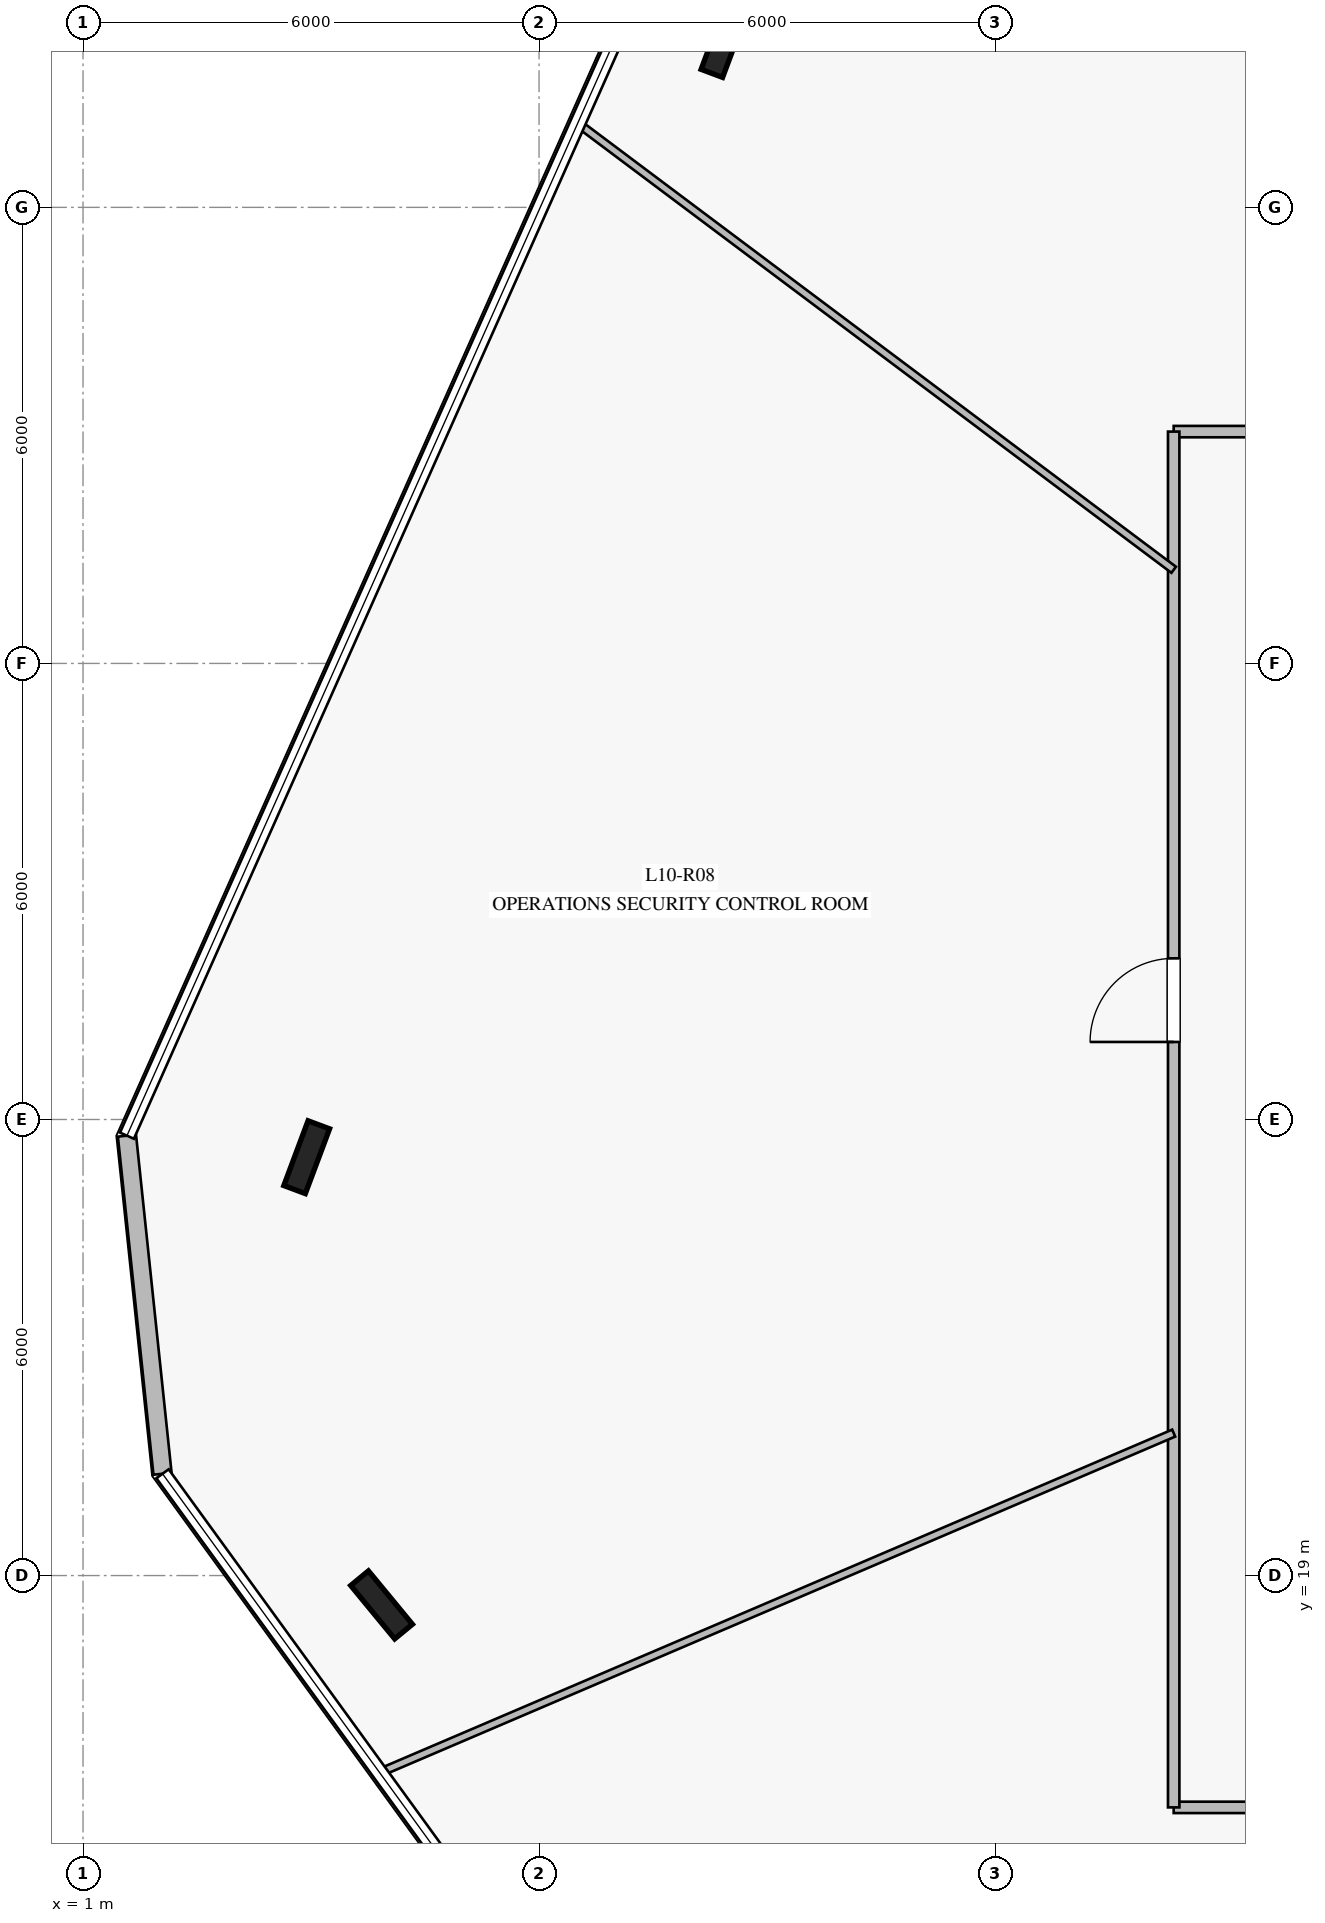
"""IFC4 building model, lengths in metres.
Left out: names, types, materials, properties, quantities, classifications, styles, units other than length and angle.
Written with IfcOpenShell. Run it as: python <this file> out.ifc"""

import sys

from ifc_helpers import new_model, si_unit, direction, frame, frame_2d, origin, origin_2d, place, context, subcontext, project, spatial, rectangle, i_section, extrude, element, fill, save


model = new_model("IFC4")
c1 = context("Model", 3, precision=1e-05, world=origin(), true_north=direction((0.0, 1.0)))
c2 = subcontext(c1, "Body", "Model", "MODEL_VIEW")
j1 = project(units=[si_unit("LENGTHUNIT", "METRE"), si_unit("PLANEANGLEUNIT", "RADIAN")], contexts=[c1])
p1 = place(None, origin())
s1 = spatial("IfcSite", under=j1, at=p1, CompositionType="ELEMENT")
p2 = place(p1, origin())
s2 = spatial("IfcBuilding", under=s1, at=p2, CompositionType="ELEMENT")
p3 = place(p2, frame((0.0, 0.0, 44.0)))
s3 = spatial("IfcBuildingStorey", under=s2, at=p3, CompositionType="ELEMENT", Elevation=44.0)
for number, where, z_axis, x_axis in (
    (1, (9.433, 39.189, 0.0), (0.0, 0.0, 1.0), (0.35, 0.937, 0.0)),
    (2, (3.943, 24.504, 0.0), (0.0, 0.0, 1.0), (0.35, 0.937, 0.0)),
    (3, (4.928, 18.614, 0.0), (0.0, 0.0, 1.0), (-0.636, 0.772, 0.0)),
):
    element("IfcColumn", number, at=place(p3, frame(where, z_axis=z_axis, x_axis=x_axis)), inside=s3, PredefinedType="COLUMN", context=c2, shape_type="SweptSolid", body=[
        extrude(i_section(OverallWidth=0.302, OverallDepth=0.91, WebThickness=0.021, FlangeThickness=0.04, at=origin_2d()), origin(), (0.0, 0.0, 1.0), 4.0),
    ])
p4 = place(p3, frame((1.578, 24.787, 0.0), z_axis=(0.0, 0.0, 1.0), x_axis=(0.104642162151, -0.994509938563, 0.0)))
e4 = element("IfcWall", 4, at=p4, inside=s3, PredefinedType="STANDARD", context=c2, shape_type="SweptSolid", body=[
    extrude(rectangle(XDim=4.473, YDim=0.24, at=frame_2d((2.236, 0.0))), origin(), (0.0, 0.0, 1.0), 3.76),
])
p5 = place(p3, frame((15.35, 34.05, 0.0), z_axis=(0.0, 0.0, 1.0), x_axis=(1.0, 0.0, 0.0)))
e5 = element("IfcWall", 5, at=p5, inside=s3, PredefinedType="PARTITIONING", context=c2, shape_type="SweptSolid", body=[
    extrude(rectangle(XDim=19.3, YDim=0.15, at=frame_2d((9.65, 0.0))), origin(), (0.0, 0.0, 1.0), 3.21),
])
p6 = place(p5, frame((13.94, 0.0, 0.0)))
e6 = element("IfcOpeningElement", 6, at=p6, cuts=e5, PredefinedType="OPENING", context=c2, shape_type="SweptSolid", body=[
    extrude(rectangle(XDim=1.1, YDim=2.2, at=frame_2d((0.55, 1.1))), frame((0.0, 0.085, 0.0), z_axis=(0.0, -1.0, 0.0), x_axis=(1.0, 0.0, 0.0)), (0.0, 0.0, 1.0), 0.17),
])
p7 = place(p5, frame((4.582, 0.0, 0.0)))
e7 = element("IfcOpeningElement", 7, at=p7, cuts=e5, PredefinedType="OPENING", context=c2, shape_type="SweptSolid", body=[
    extrude(rectangle(XDim=1.1, YDim=2.2, at=frame_2d((0.55, 1.1))), frame((0.0, 0.085, 0.0), z_axis=(0.0, -1.0, 0.0), x_axis=(1.0, 0.0, 0.0)), (0.0, 0.0, 1.0), 0.17),
])
p8 = place(p3, frame((34.65, 15.95, 0.0), z_axis=(0.0, 0.0, 1.0), x_axis=(-1.0, 0.0, 0.0)))
e8 = element("IfcWall", 8, at=p8, inside=s3, PredefinedType="PARTITIONING", context=c2, shape_type="SweptSolid", body=[
    extrude(rectangle(XDim=19.3, YDim=0.15, at=frame_2d((9.65, 0.0))), origin(), (0.0, 0.0, 1.0), 3.21),
])
p9 = place(p8, frame((15.181, 0.0, 0.0)))
e9 = element("IfcOpeningElement", 9, at=p9, cuts=e8, PredefinedType="OPENING", context=c2, shape_type="SweptSolid", body=[
    extrude(rectangle(XDim=1.1, YDim=2.2, at=frame_2d((0.55, 1.1))), frame((0.0, 0.085, 0.0), z_axis=(0.0, -1.0, 0.0), x_axis=(1.0, 0.0, 0.0)), (0.0, 0.0, 1.0), 0.17),
])
p10 = place(p8, frame((6.497, 0.0, 0.0)))
e10 = element("IfcOpeningElement", 10, at=p10, cuts=e8, PredefinedType="OPENING", context=c2, shape_type="SweptSolid", body=[
    extrude(rectangle(XDim=1.1, YDim=2.2, at=frame_2d((0.55, 1.1))), frame((0.0, 0.085, 0.0), z_axis=(0.0, -1.0, 0.0), x_axis=(1.0, 0.0, 0.0)), (0.0, 0.0, 1.0), 0.17),
])
p11 = place(p3, frame((15.35, 15.95, 0.0), z_axis=(0.0, 0.0, 1.0), x_axis=(0.0, 1.0, 0.0)))
e11 = element("IfcWall", 11, at=p11, inside=s3, PredefinedType="PARTITIONING", context=c2, shape_type="SweptSolid", body=[
    extrude(rectangle(XDim=18.1, YDim=0.15, at=frame_2d((9.05, 0.0))), origin(), (0.0, 0.0, 1.0), 3.21),
])
p12 = place(p11, frame((10.07, 0.0, 0.0)))
e12 = element("IfcOpeningElement", 12, at=p12, cuts=e11, PredefinedType="OPENING", context=c2, shape_type="SweptSolid", body=[
    extrude(rectangle(XDim=1.1, YDim=2.2, at=frame_2d((0.55, 1.1))), frame((0.0, 0.085, 0.0), z_axis=(0.0, -1.0, 0.0), x_axis=(1.0, 0.0, 0.0)), (0.0, 0.0, 1.0), 0.17),
])
p13 = place(p3, frame((15.35, 32.232, 0.0), z_axis=(0.0, 0.0, 1.0), x_axis=(-0.800263515523, 0.599648485134, 0.0)))
e13 = element("IfcWall", 13, at=p13, inside=s3, PredefinedType="MOVABLE", context=c2, shape_type="SweptSolid", body=[
    extrude(rectangle(XDim=9.781, YDim=0.1, at=frame_2d((4.89, 0.0))), origin(), (0.0, 0.0, 1.0), 3.06),
])
p14 = place(p3, frame((15.35, 20.874, 0.0), z_axis=(0.0, 0.0, 1.0), x_axis=(-0.919467552989, -0.393165892468, 0.0)))
e14 = element("IfcWall", 14, at=p14, inside=s3, PredefinedType="MOVABLE", context=c2, shape_type="SweptSolid", body=[
    extrude(rectangle(XDim=11.344, YDim=0.1, at=frame_2d((5.672, 0.0))), origin(), (0.0, 0.0, 1.0), 3.06),
])
p15 = place(p12, origin())
e15 = element("IfcDoor", 15, at=p15, inside=s3, OperationType="SINGLE_SWING_LEFT", PredefinedType="DOOR", context=c2, shape_type="SweptSolid", body=[
    extrude(rectangle(XDim=1.1, YDim=2.2, at=frame_2d((0.55, 1.1))), frame((0.0, 0.025, 0.0), z_axis=(0.0, -1.0, 0.0), x_axis=(1.0, 0.0, 0.0)), (0.0, 0.0, 1.0), 0.05),
])
fill(e12, e15)
save(model, sys.argv[1])
